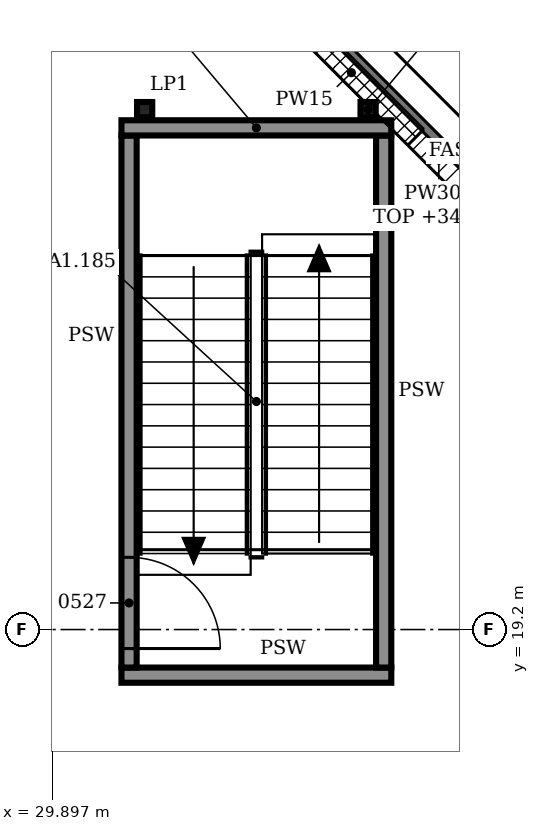
"""IFC4 building model, lengths in metres.
Left out: names, types, materials, properties, quantities, classifications, styles, units other than length and angle.
Written with IfcOpenShell. Run it as: python <this file> out.ifc"""

import sys

from ifc_helpers import new_model, si_unit, direction, frame, frame_2d, origin, origin_2d, place, context, subcontext, project, spatial, rectangle, i_section, extrude, element, fill, save


model = new_model("IFC4")
c1 = context("Model", 3, precision=1e-05, world=origin(), true_north=direction((0.0, 1.0)))
c2 = subcontext(c1, "Body", "Model", "MODEL_VIEW")
j1 = project(units=[si_unit("LENGTHUNIT", "METRE"), si_unit("PLANEANGLEUNIT", "RADIAN")], contexts=[c1])
p1 = place(None, origin())
s1 = spatial("IfcSite", under=j1, at=p1, CompositionType="ELEMENT")
p2 = place(p1, origin())
s2 = spatial("IfcBuilding", under=s1, at=p2, CompositionType="ELEMENT")
p3 = place(p2, frame((0.0, 0.0, 30.6)))
s3 = spatial("IfcBuildingStorey", under=s2, at=p3, CompositionType="ELEMENT", Elevation=30.6)
for number, where, z_axis, x_axis in (
    (1, (31.105, 26.04, 0.0), (0.0, 0.0, 1.0), (1.0, 0.0, 0.0)),
    (2, (34.045, 26.04, 0.0), (0.0, 0.0, 1.0), (1.0, 0.0, 0.0)),
):
    element("IfcColumn", number, at=place(p3, frame(where, z_axis=z_axis, x_axis=x_axis)), inside=s3, PredefinedType="COLUMN", context=c2, shape_type="SweptSolid", body=[
        extrude(i_section(OverallWidth=0.2, OverallDepth=0.2, WebThickness=0.009, FlangeThickness=0.015, FilletRadius=0.018, at=origin_2d()), origin(), (0.0, 0.0, 1.0), 2.2),
    ])
p4 = place(p3, frame((37.277, 23.075, 0.0), z_axis=(0.0, 0.0, 1.0), x_axis=(-0.707088024292, 0.707125537583, 0.0)))
e3 = element("IfcWall", 3, at=p4, inside=s3, PredefinedType="SOLIDWALL", context=c2, shape_type="SweptSolid", body=[
    extrude(rectangle(XDim=6.508, YDim=0.3, at=frame_2d((3.254, 0.0))), origin(), (0.0, 0.0, 1.0), 4.0),
])
p5 = place(p4, frame((0.427, 0.0, 0.9)))
e4 = element("IfcOpeningElement", 4, at=p5, cuts=e3, PredefinedType="OPENING", context=c2, shape_type="SweptSolid", body=[
    extrude(rectangle(XDim=2.4, YDim=1.5, at=frame_2d((1.2, 0.75))), frame((0.0, 0.16, 0.0), z_axis=(0.0, -1.0, 0.0), x_axis=(1.0, 0.0, 0.0)), (0.0, 0.0, 1.0), 0.32),
])
p6 = place(p4, frame((3.681, 0.0, 0.9)))
e5 = element("IfcOpeningElement", 5, at=p6, cuts=e3, PredefinedType="OPENING", context=c2, shape_type="SweptSolid", body=[
    extrude(rectangle(XDim=2.4, YDim=1.5, at=frame_2d((1.2, 0.75))), frame((0.0, 0.16, 0.0), z_axis=(0.0, -1.0, 0.0), x_axis=(1.0, 0.0, 0.0)), (0.0, 0.0, 1.0), 0.32),
])
p7 = place(p3, frame((30.8, 18.6, 0.0), z_axis=(0.0, 0.0, 1.0), x_axis=(1.0, 0.0, 0.0)))
e6 = element("IfcWall", 6, at=p7, inside=s3, PredefinedType="SOLIDWALL", context=c2, shape_type="SweptSolid", body=[
    extrude(rectangle(XDim=3.55, YDim=0.2, at=frame_2d((1.775, 0.0))), origin(), (0.0, 0.0, 1.0), 4.6),
])
p8 = place(p3, frame((30.9, 18.7, 0.0), z_axis=(0.0, 0.0, 1.0), x_axis=(0.0, 1.0, 0.0)))
e7 = element("IfcWall", 7, at=p8, inside=s3, PredefinedType="SOLIDWALL", context=c2, shape_type="SweptSolid", body=[
    extrude(rectangle(XDim=7.0, YDim=0.2, at=frame_2d((3.5, 0.0))), origin(), (0.0, 0.0, 1.0), 4.6),
])
p9 = place(p8, frame((0.25, 0.0, 0.0)))
e8 = element("IfcOpeningElement", 8, at=p9, cuts=e7, PredefinedType="OPENING", context=c2, shape_type="SweptSolid", body=[
    extrude(rectangle(XDim=1.2, YDim=2.1, at=frame_2d((0.6, 1.05))), frame((0.0, 0.11, 0.0), z_axis=(0.0, -1.0, 0.0), x_axis=(1.0, 0.0, 0.0)), (0.0, 0.0, 1.0), 0.22),
])
p10 = place(p3, frame((34.25, 18.7, 0.0), z_axis=(0.0, 0.0, 1.0), x_axis=(0.0, 1.0, 0.0)))
e9 = element("IfcWall", 9, at=p10, inside=s3, PredefinedType="SOLIDWALL", context=c2, shape_type="SweptSolid", body=[
    extrude(rectangle(XDim=7.0, YDim=0.2, at=frame_2d((3.5, 0.0))), origin(), (0.0, 0.0, 1.0), 4.6),
])
p11 = place(p3, frame((30.8, 25.8, 0.0), z_axis=(0.0, 0.0, 1.0), x_axis=(1.0, 0.0, 0.0)))
e10 = element("IfcWall", 10, at=p11, inside=s3, PredefinedType="SOLIDWALL", context=c2, shape_type="SweptSolid", body=[
    extrude(rectangle(XDim=3.55, YDim=0.2, at=frame_2d((1.775, 0.0))), origin(), (0.0, 0.0, 1.0), 4.6),
])
p12 = place(p6, origin())
e11 = element("IfcWindow", 11, at=p12, inside=s3, PartitioningType="SINGLE_PANEL", PredefinedType="WINDOW", context=c2, shape_type="SweptSolid", body=[
    extrude(rectangle(XDim=2.4, YDim=1.5, at=frame_2d((1.2, 0.75))), frame((0.0, 0.03, 0.0), z_axis=(0.0, -1.0, 0.0), x_axis=(1.0, 0.0, 0.0)), (0.0, 0.0, 1.0), 0.06),
])
fill(e5, e11)
p13 = place(p9, frame((1.2, 0.0, 0.0), z_axis=(0.0, 0.0, 1.0), x_axis=(-1.0, 0.0, 0.0)))
e12 = element("IfcDoor", 12, at=p13, inside=s3, OperationType="SINGLE_SWING_RIGHT", PredefinedType="DOOR", context=c2, shape_type="SweptSolid", body=[
    extrude(rectangle(XDim=1.2, YDim=2.1, at=frame_2d((0.6, 1.05))), frame((0.0, 0.025, 0.0), z_axis=(0.0, -1.0, 0.0), x_axis=(1.0, 0.0, 0.0)), (0.0, 0.0, 1.0), 0.05),
])
fill(e8, e12)
save(model, sys.argv[1])
